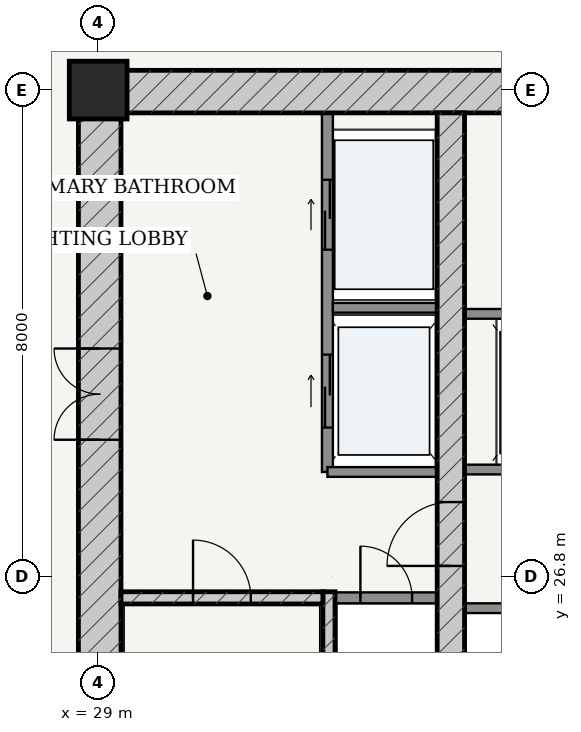
"""IFC4 building model, lengths in metres.
Left out: names, types, materials, properties, quantities, classifications, styles, units other than length and angle.
Written with IfcOpenShell. Run it as: python <this file> out.ifc"""

import sys

from ifc_helpers import new_model, si_unit, direction, frame, frame_2d, origin, origin_2d, place, context, subcontext, project, spatial, rectangle, extrude, source, transform, mapped, element, fill, save


model = new_model("IFC4")
c1 = context("Model", 3, precision=1e-05, world=origin(), true_north=direction((-0.2419218956, 0.970295726276)))
c2 = subcontext(c1, "Body", "Model", "MODEL_VIEW")
j1 = project(units=[si_unit("LENGTHUNIT", "METRE"), si_unit("PLANEANGLEUNIT", "RADIAN")], contexts=[c1])
p1 = place(None, origin())
s1 = spatial("IfcSite", under=j1, at=p1, CompositionType="ELEMENT")
p2 = place(p1, origin())
s2 = spatial("IfcBuilding", under=s1, at=p2, CompositionType="ELEMENT")
p3 = place(p2, frame((0.0, 0.0, 126.6)))
s3 = spatial("IfcBuildingStorey", under=s2, at=p3, CompositionType="ELEMENT", Elevation=126.6)
p4 = place(p3, frame((29.0, 34.8, 0.0), z_axis=(0.0, 0.0, 1.0), x_axis=(1.0, 0.0, 0.0)))
e1 = element("IfcColumn", 1, at=p4, inside=s3, PredefinedType="COLUMN", context=c2, shape_type="SweptSolid", body=[
    extrude(rectangle(XDim=0.95, YDim=0.95, at=origin_2d()), origin(), (0.0, 0.0, 1.0), 3.6),
])
p5 = place(p3, frame((28.675, 34.775, 0.0), z_axis=(0.0, 0.0, 1.0), x_axis=(1.0, 0.0, 0.0)))
e2 = element("IfcWall", 2, at=p5, inside=s3, PredefinedType="SHEAR", context=c2, shape_type="SweptSolid", body=[
    extrude(rectangle(XDim=18.65, YDim=0.7, at=frame_2d((9.325, 0.0))), origin(), (0.0, 0.0, 1.0), 3.15),
])
p6 = place(p5, frame((8.9, 0.0, 0.0)))
e3 = element("IfcOpeningElement", 3, at=p6, cuts=e2, PredefinedType="OPENING", context=c2, shape_type="SweptSolid", body=[
    extrude(rectangle(XDim=0.85, YDim=2.1, at=frame_2d((0.425, 1.05))), frame((0.0, 0.36, 0.0), z_axis=(0.0, -1.0, 0.0), x_axis=(1.0, 0.0, 0.0)), (0.0, 0.0, 1.0), 0.72),
])
p7 = place(p3, frame((29.025, 19.175, 0.0), z_axis=(0.0, 0.0, 1.0), x_axis=(0.0, 1.0, 0.0)))
e4 = element("IfcWall", 4, at=p7, inside=s3, PredefinedType="SHEAR", context=c2, shape_type="SweptSolid", body=[
    extrude(rectangle(XDim=15.25, YDim=0.7, at=frame_2d((7.625, 0.0))), origin(), (0.0, 0.0, 1.0), 3.15),
])
p8 = place(p7, frame((9.875, 0.0, 0.0)))
e5 = element("IfcOpeningElement", 5, at=p8, cuts=e4, PredefinedType="OPENING", context=c2, shape_type="SweptSolid", body=[
    extrude(rectangle(XDim=1.5, YDim=2.2, at=frame_2d((0.75, 1.1))), frame((0.0, 0.36, 0.0), z_axis=(0.0, -1.0, 0.0), x_axis=(1.0, 0.0, 0.0)), (0.0, 0.0, 1.0), 0.72),
])
p9 = place(p3, frame((32.795, 19.175, 0.0), z_axis=(0.0, 0.0, 1.0), x_axis=(0.0, 1.0, 0.0)))
e6 = element("IfcWall", 6, at=p9, inside=s3, PredefinedType="SOLIDWALL", context=c2, shape_type="SweptSolid", body=[
    extrude(rectangle(XDim=7.375, YDim=0.2, at=frame_2d((3.688, 0.0))), origin(), (0.0, 0.0, 1.0), 3.15),
])
p10 = place(p3, frame((29.375, 26.45, 0.0), z_axis=(0.0, 0.0, 1.0), x_axis=(1.0, 0.0, 0.0)))
e7 = element("IfcWall", 7, at=p10, inside=s3, PredefinedType="SOLIDWALL", context=c2, shape_type="SweptSolid", body=[
    extrude(rectangle(XDim=3.32, YDim=0.2, at=frame_2d((1.66, 0.0))), origin(), (0.0, 0.0, 1.0), 3.15),
])
p11 = place(p10, frame((1.185, 0.0, 0.0)))
e8 = element("IfcOpeningElement", 8, at=p11, cuts=e7, PredefinedType="OPENING", context=c2, shape_type="SweptSolid", body=[
    extrude(rectangle(XDim=0.95, YDim=2.15, at=frame_2d((0.475, 1.075))), frame((0.0, 0.11, 0.0), z_axis=(0.0, -1.0, 0.0), x_axis=(1.0, 0.0, 0.0)), (0.0, 0.0, 1.0), 0.22),
])
p12 = place(p3, frame((34.8, 19.175, 0.0), z_axis=(0.0, 0.0, 1.0), x_axis=(0.0, 1.0, 0.0)))
e9 = element("IfcWall", 9, at=p12, inside=s3, PredefinedType="SHEAR", context=c2, shape_type="SweptSolid", body=[
    extrude(rectangle(XDim=15.25, YDim=0.45, at=frame_2d((7.625, 0.0))), origin(), (0.0, 0.0, 1.0), 3.15),
])
p13 = place(p12, frame((7.8, 0.0, 0.0)))
e10 = element("IfcOpeningElement", 10, at=p13, cuts=e9, PredefinedType="OPENING", context=c2, shape_type="SweptSolid", body=[
    extrude(rectangle(XDim=1.05, YDim=2.15, at=frame_2d((0.525, 1.075))), frame((0.0, 0.235, 0.0), z_axis=(0.0, -1.0, 0.0), x_axis=(1.0, 0.0, 0.0)), (0.0, 0.0, 1.0), 0.47),
])
p14 = place(p3, frame((32.9, 26.45, 0.0), z_axis=(0.0, 0.0, 1.0), x_axis=(1.0, 0.0, 0.0)))
e11 = element("IfcWall", 11, at=p14, inside=s3, PredefinedType="PARTITIONING", context=c2, shape_type="SweptSolid", body=[
    extrude(rectangle(XDim=1.675, YDim=0.18, at=frame_2d((0.837, 0.0))), origin(), (0.0, 0.0, 1.0), 3.15),
])
p15 = place(p14, frame((0.413, 0.0, 0.0)))
e12 = element("IfcOpeningElement", 12, at=p15, cuts=e11, PredefinedType="OPENING", context=c2, shape_type="SweptSolid", body=[
    extrude(rectangle(XDim=0.85, YDim=2.1, at=frame_2d((0.425, 1.05))), frame((0.0, 0.1, 0.0), z_axis=(0.0, -1.0, 0.0), x_axis=(1.0, 0.0, 0.0)), (0.0, 0.0, 1.0), 0.2),
])
p16 = place(p3, frame((32.77, 28.52, 0.0), z_axis=(0.0, 0.0, 1.0), x_axis=(0.0, 1.0, 0.0)))
e13 = element("IfcWall", 13, at=p16, inside=s3, PredefinedType="PARTITIONING", context=c2, shape_type="SweptSolid", body=[
    extrude(rectangle(XDim=5.905, YDim=0.18, at=frame_2d((2.953, 0.0))), origin(), (0.0, 0.0, 1.0), 3.15),
])
p17 = place(p16, frame((3.655, 0.0, 0.0)))
e14 = element("IfcOpeningElement", 14, at=p17, cuts=e13, PredefinedType="OPENING", context=c2, shape_type="SweptSolid", body=[
    extrude(rectangle(XDim=1.15, YDim=2.2, at=frame_2d((0.575, 1.1))), frame((0.0, 0.1, 0.0), z_axis=(0.0, -1.0, 0.0), x_axis=(1.0, 0.0, 0.0)), (0.0, 0.0, 1.0), 0.2),
])
p18 = place(p16, frame((0.73, 0.0, 0.0)))
e15 = element("IfcOpeningElement", 15, at=p18, cuts=e13, PredefinedType="OPENING", context=c2, shape_type="SweptSolid", body=[
    extrude(rectangle(XDim=1.2, YDim=2.25, at=frame_2d((0.6, 1.125))), frame((0.0, 0.1, 0.0), z_axis=(0.0, -1.0, 0.0), x_axis=(1.0, 0.0, 0.0)), (0.0, 0.0, 1.0), 0.2),
])
p19 = place(p3, frame((32.86, 31.22, 0.0), z_axis=(0.0, 0.0, 1.0), x_axis=(1.0, 0.0, 0.0)))
e16 = element("IfcWall", 16, at=p19, inside=s3, PredefinedType="PARTITIONING", context=c2, shape_type="SweptSolid", body=[
    extrude(rectangle(XDim=1.715, YDim=0.16, at=frame_2d((0.857, 0.0))), origin(), (0.0, 0.0, 1.0), 3.15),
])
p20 = place(p3, frame((32.77, 28.52, 0.0), z_axis=(0.0, 0.0, 1.0), x_axis=(1.0, 0.0, 0.0)))
e17 = element("IfcWall", 17, at=p20, inside=s3, PredefinedType="PARTITIONING", context=c2, shape_type="SweptSolid", body=[
    extrude(rectangle(XDim=1.805, YDim=0.16, at=frame_2d((0.902, 0.0))), origin(), (0.0, 0.0, 1.0), 3.15),
])
p21 = place(p3, frame((35.025, 28.56, 0.0), z_axis=(0.0, 0.0, 1.0), x_axis=(1.0, 0.0, 0.0)))
e18 = element("IfcWall", 18, at=p21, inside=s3, PredefinedType="PARTITIONING", context=c2, shape_type="SweptSolid", body=[
    extrude(rectangle(XDim=5.95, YDim=0.16, at=frame_2d((2.975, 0.0))), origin(), (0.0, 0.0, 1.0), 3.15),
])
p22 = place(p21, frame((0.76, 0.0, 0.0)))
e19 = element("IfcOpeningElement", 19, at=p22, cuts=e18, PredefinedType="OPENING", context=c2, shape_type="SweptSolid", body=[
    extrude(rectangle(XDim=1.1, YDim=2.2, at=frame_2d((0.55, 1.1))), frame((0.0, 0.09, 0.0), z_axis=(0.0, -1.0, 0.0), x_axis=(1.0, 0.0, 0.0)), (0.0, 0.0, 1.0), 0.18),
])
p23 = place(p21, frame((2.425, 0.0, 0.0)))
e20 = element("IfcOpeningElement", 20, at=p23, cuts=e18, PredefinedType="OPENING", context=c2, shape_type="SweptSolid", body=[
    extrude(rectangle(XDim=1.1, YDim=2.2, at=frame_2d((0.55, 1.1))), frame((0.0, 0.09, 0.0), z_axis=(0.0, -1.0, 0.0), x_axis=(1.0, 0.0, 0.0)), (0.0, 0.0, 1.0), 0.18),
])
p24 = place(p21, frame((4.09, 0.0, 0.0)))
e21 = element("IfcOpeningElement", 21, at=p24, cuts=e18, PredefinedType="OPENING", context=c2, shape_type="SweptSolid", body=[
    extrude(rectangle(XDim=1.1, YDim=2.2, at=frame_2d((0.55, 1.1))), frame((0.0, 0.09, 0.0), z_axis=(0.0, -1.0, 0.0), x_axis=(1.0, 0.0, 0.0)), (0.0, 0.0, 1.0), 0.18),
])
for number, where, z_axis, x_axis in (
    (22, (35.025, 31.12, 0.0), (0.0, 0.0, 1.0), (1.0, 0.0, 0.0)),
    (23, (35.025, 26.28, 0.0), (0.0, 0.0, 1.0), (1.0, 0.0, 0.0)),
):
    element("IfcWall", number, at=place(p3, frame(where, z_axis=z_axis, x_axis=x_axis)), inside=s3, PredefinedType="PARTITIONING", context=c2, shape_type="SweptSolid", body=[
        extrude(rectangle(XDim=5.95, YDim=0.16, at=frame_2d((2.975, 0.0))), origin(), (0.0, 0.0, 1.0), 3.15),
    ])
m1 = source(origin(), c2, "Body", "SweptSolid", [
    extrude(rectangle(XDim=1.5, YDim=2.2, at=frame_2d((0.75, 1.1))), frame((0.0, 0.025, 0.0), z_axis=(0.0, -1.0, 0.0), x_axis=(1.0, 0.0, 0.0)), (0.0, 0.0, 1.0), 0.05),
])
p25 = place(p8, origin())
e24 = element("IfcDoor", 24, at=p25, inside=s3, OperationType="DOUBLE_DOOR_SINGLE_SWING", PredefinedType="DOOR", context=c2, shape_type="MappedRepresentation", body=[
    mapped(m1, transform((0.0, 0.0, 0.0), scale=1.0)),
])
fill(e5, e24)
m2 = source(origin(), c2, "Body", "SweptSolid", [
    extrude(rectangle(XDim=1.05, YDim=2.15, at=frame_2d((0.525, 1.075))), frame((0.0, 0.025, 0.0), z_axis=(0.0, -1.0, 0.0), x_axis=(1.0, 0.0, 0.0)), (0.0, 0.0, 1.0), 0.05),
])
p26 = place(p13, origin())
e25 = element("IfcDoor", 25, at=p26, inside=s3, OperationType="SINGLE_SWING_LEFT", PredefinedType="DOOR", context=c2, shape_type="MappedRepresentation", body=[
    mapped(m2, transform((0.0, 0.0, 0.0), scale=1.0)),
])
fill(e10, e25)
m3 = source(origin(), c2, "Body", "SweptSolid", [
    extrude(rectangle(XDim=0.95, YDim=2.15, at=frame_2d((0.475, 1.075))), frame((0.0, 0.025, 0.0), z_axis=(0.0, -1.0, 0.0), x_axis=(1.0, 0.0, 0.0)), (0.0, 0.0, 1.0), 0.05),
])
p27 = place(p11, origin())
e26 = element("IfcDoor", 26, at=p27, inside=s3, OperationType="SINGLE_SWING_LEFT", PredefinedType="DOOR", context=c2, shape_type="MappedRepresentation", body=[
    mapped(m3, transform((0.0, 0.0, 0.0), scale=1.0)),
])
fill(e8, e26)
m4 = source(origin(), c2, "Body", "SweptSolid", [
    extrude(rectangle(XDim=0.85, YDim=2.1, at=frame_2d((0.425, 1.05))), frame((0.0, 0.025, 0.0), z_axis=(0.0, -1.0, 0.0), x_axis=(1.0, 0.0, 0.0)), (0.0, 0.0, 1.0), 0.05),
])
p28 = place(p15, origin())
e27 = element("IfcDoor", 27, at=p28, inside=s3, OperationType="SINGLE_SWING_LEFT", PredefinedType="DOOR", context=c2, shape_type="MappedRepresentation", body=[
    mapped(m4, transform((0.0, 0.0, 0.0), scale=1.0)),
])
fill(e12, e27)
m5 = source(origin(), c2, "Body", "SweptSolid", [
    extrude(rectangle(XDim=1.15, YDim=2.2, at=frame_2d((0.575, 1.1))), frame((0.0, 0.025, 0.0), z_axis=(0.0, -1.0, 0.0), x_axis=(1.0, 0.0, 0.0)), (0.0, 0.0, 1.0), 0.05),
])
p29 = place(p17, origin())
e28 = element("IfcDoor", 28, at=p29, inside=s3, OperationType="DOUBLE_DOOR_SLIDING", PredefinedType="DOOR", context=c2, shape_type="MappedRepresentation", body=[
    mapped(m5, transform((0.0, 0.0, 0.0), scale=1.0)),
])
fill(e14, e28)
m6 = source(origin(), c2, "Body", "SweptSolid", [
    extrude(rectangle(XDim=1.2, YDim=2.25, at=frame_2d((0.6, 1.125))), frame((0.0, 0.025, 0.0), z_axis=(0.0, -1.0, 0.0), x_axis=(1.0, 0.0, 0.0)), (0.0, 0.0, 1.0), 0.05),
])
p30 = place(p18, origin())
e29 = element("IfcDoor", 29, at=p30, inside=s3, OperationType="DOUBLE_DOOR_SLIDING", PredefinedType="DOOR", context=c2, shape_type="MappedRepresentation", body=[
    mapped(m6, transform((0.0, 0.0, 0.0), scale=1.0)),
])
fill(e15, e29)
save(model, sys.argv[1])
